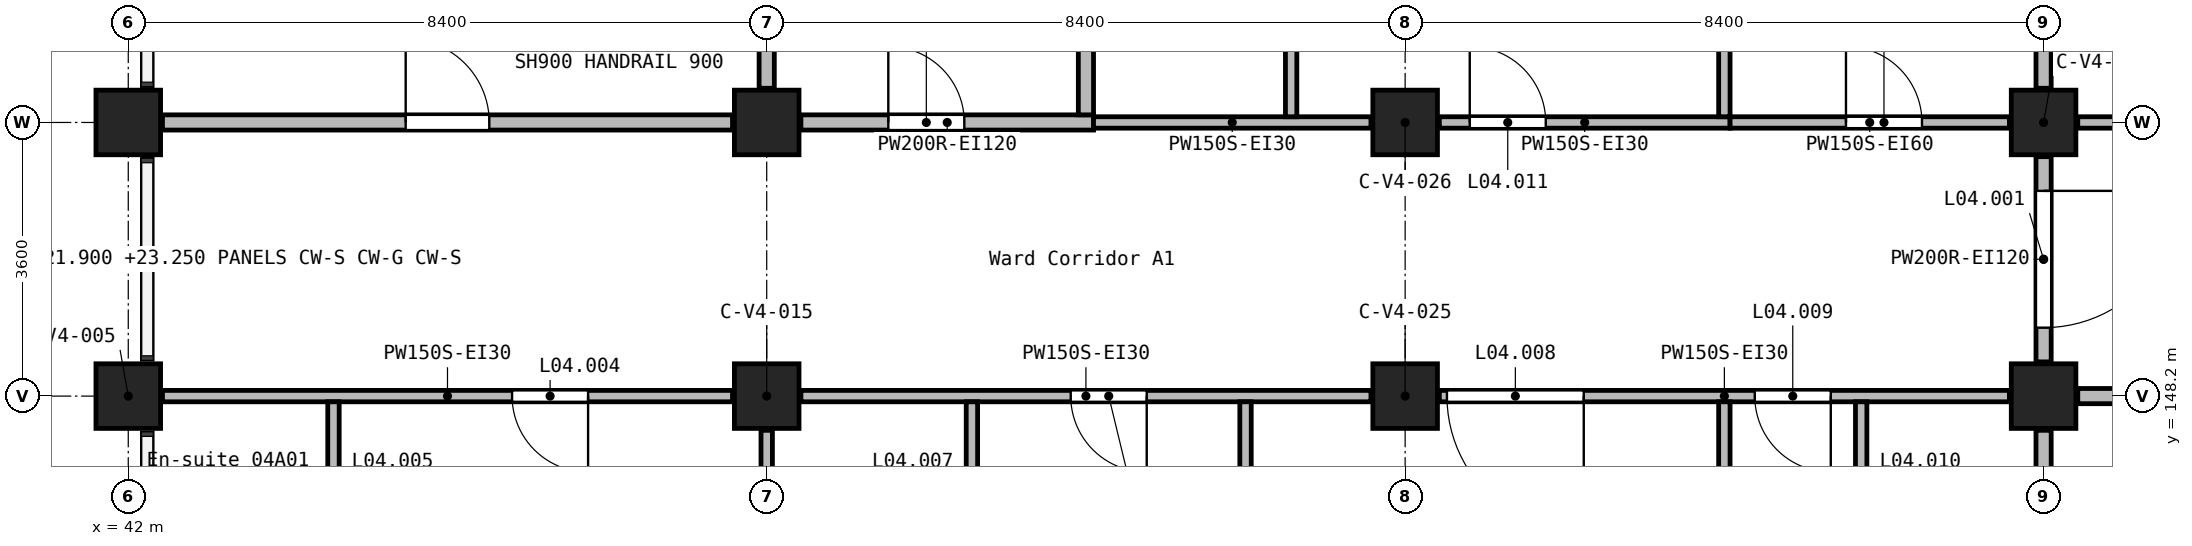
"""IFC4 building model, lengths in metres.
Left out: names, types, materials, properties, quantities, classifications, styles, units other than length and angle.
Written with IfcOpenShell. Run it as: python <this file> out.ifc"""

import sys

from ifc_helpers import new_model, si_unit, direction, frame, frame_2d, origin, origin_2d, place, context, subcontext, project, spatial, rectangle, extrude, element, fill, save


model = new_model("IFC4")
c1 = context("Model", 3, precision=1e-05, world=origin(), true_north=direction((0.0, 1.0)))
c2 = subcontext(c1, "Body", "Model", "MODEL_VIEW")
j1 = project(units=[si_unit("LENGTHUNIT", "METRE"), si_unit("PLANEANGLEUNIT", "RADIAN")], contexts=[c1])
p1 = place(None, origin())
s1 = spatial("IfcSite", under=j1, at=p1, CompositionType="ELEMENT")
p2 = place(p1, origin())
s2 = spatial("IfcBuilding", under=s1, at=p2, CompositionType="ELEMENT")
p3 = place(p2, frame((0.0, 0.0, 21.0)))
s3 = spatial("IfcBuildingStorey", under=s2, at=p3, CompositionType="ELEMENT", Elevation=21.0)
for number, where, z_axis, x_axis in (
    (1, (42.0, 148.2, 0.0), (0.0, 0.0, 1.0), (1.0, 0.0, 0.0)),
    (2, (42.0, 151.8, 0.0), (0.0, 0.0, 1.0), (1.0, 0.0, 0.0)),
    (3, (50.4, 148.2, 0.0), (0.0, 0.0, 1.0), (1.0, 0.0, 0.0)),
    (4, (50.4, 151.8, 0.0), (0.0, 0.0, 1.0), (1.0, 0.0, 0.0)),
    (5, (58.8, 148.2, 0.0), (0.0, 0.0, 1.0), (1.0, 0.0, 0.0)),
    (6, (58.8, 151.8, 0.0), (0.0, 0.0, 1.0), (1.0, 0.0, 0.0)),
    (7, (67.2, 148.2, 0.0), (0.0, 0.0, 1.0), (1.0, 0.0, 0.0)),
    (8, (67.2, 151.8, 0.0), (0.0, 0.0, 1.0), (1.0, 0.0, 0.0)),
):
    element("IfcColumn", number, at=place(p3, frame(where, z_axis=z_axis, x_axis=x_axis)), inside=s3, PredefinedType="COLUMN", context=c2, shape_type="SweptSolid", body=[
        extrude(rectangle(XDim=0.85, YDim=0.85, at=origin_2d()), origin(), (0.0, 0.0, 1.0), 3.9),
    ])
p4 = place(p3, frame((67.2, 159.15, 0.0), z_axis=(0.0, 0.0, 1.0), x_axis=(0.0, -1.0, 0.0)))
e9 = element("IfcWall", 9, at=p4, inside=s3, PredefinedType="SOLIDWALL", context=c2, shape_type="SweptSolid", body=[
    extrude(rectangle(XDim=6.9, YDim=0.2, at=frame_2d((3.45, 0.0))), origin(), (0.0, 0.0, 1.0), 3.6),
])
p5 = place(p3, frame((67.2, 151.35, 0.0), z_axis=(0.0, 0.0, 1.0), x_axis=(0.0, -1.0, 0.0)))
e10 = element("IfcWall", 10, at=p5, inside=s3, PredefinedType="SOLIDWALL", context=c2, shape_type="SweptSolid", body=[
    extrude(rectangle(XDim=2.7, YDim=0.2, at=frame_2d((1.35, 0.0))), origin(), (0.0, 0.0, 1.0), 3.6),
])
p6 = place(p5, frame((0.45, 0.0, 0.0)))
e11 = element("IfcOpeningElement", 11, at=p6, cuts=e10, PredefinedType="OPENING", context=c2, shape_type="SweptSolid", body=[
    extrude(rectangle(XDim=1.8, YDim=2.1, at=frame_2d((0.9, 1.05))), frame((0.0, 0.11, 0.0), z_axis=(0.0, -1.0, 0.0), x_axis=(1.0, 0.0, 0.0)), (0.0, 0.0, 1.0), 0.22),
])
p7 = place(p3, frame((67.2, 147.75, 0.0), z_axis=(0.0, 0.0, 1.0), x_axis=(0.0, -1.0, 0.0)))
e12 = element("IfcWall", 12, at=p7, inside=s3, PredefinedType="SOLIDWALL", context=c2, shape_type="SweptSolid", body=[
    extrude(rectangle(XDim=1.975, YDim=0.2, at=frame_2d((0.988, 0.0))), origin(), (0.0, 0.0, 1.0), 3.6),
])
p8 = place(p3, frame((42.45, 151.8, 0.0), z_axis=(0.0, 0.0, 1.0), x_axis=(1.0, 0.0, 0.0)))
e13 = element("IfcWall", 13, at=p8, inside=s3, PredefinedType="SOLIDWALL", context=c2, shape_type="SweptSolid", body=[
    extrude(rectangle(XDim=7.5, YDim=0.2, at=frame_2d((3.75, 0.0))), origin(), (0.0, 0.0, 1.0), 3.6),
])
p9 = place(p8, frame((3.2, 0.0, 0.0)))
e14 = element("IfcOpeningElement", 14, at=p9, cuts=e13, PredefinedType="OPENING", context=c2, shape_type="SweptSolid", body=[
    extrude(rectangle(XDim=1.1, YDim=2.1, at=frame_2d((0.55, 1.05))), frame((0.0, 0.11, 0.0), z_axis=(0.0, -1.0, 0.0), x_axis=(1.0, 0.0, 0.0)), (0.0, 0.0, 1.0), 0.22),
])
p10 = place(p3, frame((50.85, 151.8, 0.0), z_axis=(0.0, 0.0, 1.0), x_axis=(1.0, 0.0, 0.0)))
e15 = element("IfcWall", 15, at=p10, inside=s3, PredefinedType="SOLIDWALL", context=c2, shape_type="SweptSolid", body=[
    extrude(rectangle(XDim=3.85, YDim=0.2, at=frame_2d((1.925, 0.0))), origin(), (0.0, 0.0, 1.0), 3.6),
])
p11 = place(p10, frame((1.15, 0.0, 0.0)))
e16 = element("IfcOpeningElement", 16, at=p11, cuts=e15, PredefinedType="OPENING", context=c2, shape_type="SweptSolid", body=[
    extrude(rectangle(XDim=1.0, YDim=2.1, at=frame_2d((0.5, 1.05))), frame((0.0, 0.11, 0.0), z_axis=(0.0, -1.0, 0.0), x_axis=(1.0, 0.0, 0.0)), (0.0, 0.0, 1.0), 0.22),
])
p12 = place(p3, frame((50.4, 152.25, 0.0), z_axis=(0.0, 0.0, 1.0), x_axis=(0.0, 1.0, 0.0)))
e17 = element("IfcWall", 17, at=p12, inside=s3, PredefinedType="SOLIDWALL", context=c2, shape_type="SweptSolid", body=[
    extrude(rectangle(XDim=1.775, YDim=0.2, at=frame_2d((0.887, 0.0))), origin(), (0.0, 0.0, 1.0), 3.6),
])
p13 = place(p3, frame((67.65, 148.2, 0.0), z_axis=(0.0, 0.0, 1.0), x_axis=(1.0, 0.0, 0.0)))
e18 = element("IfcWall", 18, at=p13, inside=s3, PredefinedType="SOLIDWALL", context=c2, shape_type="SweptSolid", body=[
    extrude(rectangle(XDim=7.5, YDim=0.2, at=frame_2d((3.75, 0.0))), origin(), (0.0, 0.0, 1.0), 3.6),
])
p14 = place(p13, frame((2.85, 0.0, 0.0)))
e19 = element("IfcOpeningElement", 19, at=p14, cuts=e18, PredefinedType="OPENING", context=c2, shape_type="SweptSolid", body=[
    extrude(rectangle(XDim=1.8, YDim=2.1, at=frame_2d((0.9, 1.05))), frame((0.0, 0.11, 0.0), z_axis=(0.0, -1.0, 0.0), x_axis=(1.0, 0.0, 0.0)), (0.0, 0.0, 1.0), 0.22),
])
p15 = place(p3, frame((54.6, 151.9, 0.0), z_axis=(0.0, 0.0, 1.0), x_axis=(0.0, 1.0, 0.0)))
e20 = element("IfcWall", 20, at=p15, inside=s3, PredefinedType="SOLIDWALL", context=c2, shape_type="SweptSolid", body=[
    extrude(rectangle(XDim=7.25, YDim=0.2, at=frame_2d((3.625, 0.0))), origin(), (0.0, 0.0, 1.0), 3.6),
])
p16 = place(p3, frame((66.75, 148.2, 0.0), z_axis=(0.0, 0.0, 1.0), x_axis=(-1.0, 0.0, 0.0)))
e21 = element("IfcWall", 21, at=p16, inside=s3, PredefinedType="PARTITIONING", context=c2, shape_type="SweptSolid", body=[
    extrude(rectangle(XDim=7.5, YDim=0.15, at=frame_2d((3.75, 0.0))), origin(), (0.0, 0.0, 1.0), 3.6),
])
p17 = place(p16, frame((5.6, 0.0, 0.0)))
e22 = element("IfcOpeningElement", 22, at=p17, cuts=e21, PredefinedType="OPENING", context=c2, shape_type="SweptSolid", body=[
    extrude(rectangle(XDim=1.8, YDim=2.1, at=frame_2d((0.9, 1.05))), frame((0.0, 0.085, 0.0), z_axis=(0.0, -1.0, 0.0), x_axis=(1.0, 0.0, 0.0)), (0.0, 0.0, 1.0), 0.17),
])
p18 = place(p16, frame((2.35, 0.0, 0.0)))
e23 = element("IfcOpeningElement", 23, at=p18, cuts=e21, PredefinedType="OPENING", context=c2, shape_type="SweptSolid", body=[
    extrude(rectangle(XDim=1.0, YDim=2.1, at=frame_2d((0.5, 1.05))), frame((0.0, 0.085, 0.0), z_axis=(0.0, -1.0, 0.0), x_axis=(1.0, 0.0, 0.0)), (0.0, 0.0, 1.0), 0.17),
])
p19 = place(p3, frame((58.35, 148.2, 0.0), z_axis=(0.0, 0.0, 1.0), x_axis=(-1.0, 0.0, 0.0)))
e24 = element("IfcWall", 24, at=p19, inside=s3, PredefinedType="PARTITIONING", context=c2, shape_type="SweptSolid", body=[
    extrude(rectangle(XDim=7.5, YDim=0.15, at=frame_2d((3.75, 0.0))), origin(), (0.0, 0.0, 1.0), 3.6),
])
p20 = place(p19, frame((2.95, 0.0, 0.0)))
e25 = element("IfcOpeningElement", 25, at=p20, cuts=e24, PredefinedType="OPENING", context=c2, shape_type="SweptSolid", body=[
    extrude(rectangle(XDim=1.0, YDim=2.1, at=frame_2d((0.5, 1.05))), frame((0.0, 0.085, 0.0), z_axis=(0.0, -1.0, 0.0), x_axis=(1.0, 0.0, 0.0)), (0.0, 0.0, 1.0), 0.17),
])
p21 = place(p3, frame((49.95, 148.2, 0.0), z_axis=(0.0, 0.0, 1.0), x_axis=(-1.0, 0.0, 0.0)))
e26 = element("IfcWall", 26, at=p21, inside=s3, PredefinedType="PARTITIONING", context=c2, shape_type="SweptSolid", body=[
    extrude(rectangle(XDim=7.5, YDim=0.15, at=frame_2d((3.75, 0.0))), origin(), (0.0, 0.0, 1.0), 3.6),
])
p22 = place(p21, frame((1.9, 0.0, 0.0)))
e27 = element("IfcOpeningElement", 27, at=p22, cuts=e26, PredefinedType="OPENING", context=c2, shape_type="SweptSolid", body=[
    extrude(rectangle(XDim=1.0, YDim=2.1, at=frame_2d((0.5, 1.05))), frame((0.0, 0.085, 0.0), z_axis=(0.0, -1.0, 0.0), x_axis=(1.0, 0.0, 0.0)), (0.0, 0.0, 1.0), 0.17),
])
p23 = place(p3, frame((75.15, 151.8, 0.0), z_axis=(0.0, 0.0, 1.0), x_axis=(-1.0, 0.0, 0.0)))
e28 = element("IfcWall", 28, at=p23, inside=s3, PredefinedType="PARTITIONING", context=c2, shape_type="SweptSolid", body=[
    extrude(rectangle(XDim=7.5, YDim=0.15, at=frame_2d((3.75, 0.0))), origin(), (0.0, 0.0, 1.0), 3.6),
])
p24 = place(p23, frame((1.9, 0.0, 0.0)))
e29 = element("IfcOpeningElement", 29, at=p24, cuts=e28, PredefinedType="OPENING", context=c2, shape_type="SweptSolid", body=[
    extrude(rectangle(XDim=1.0, YDim=2.1, at=frame_2d((0.5, 1.05))), frame((0.0, 0.085, 0.0), z_axis=(0.0, -1.0, 0.0), x_axis=(1.0, 0.0, 0.0)), (0.0, 0.0, 1.0), 0.17),
])
p25 = place(p3, frame((54.7, 151.8, 0.0), z_axis=(0.0, 0.0, 1.0), x_axis=(1.0, 0.0, 0.0)))
e30 = element("IfcWall", 30, at=p25, inside=s3, PredefinedType="PARTITIONING", context=c2, shape_type="SweptSolid", body=[
    extrude(rectangle(XDim=3.65, YDim=0.15, at=frame_2d((1.825, 0.0))), origin(), (0.0, 0.0, 1.0), 3.6),
])
p26 = place(p3, frame((59.25, 151.8, 0.0), z_axis=(0.0, 0.0, 1.0), x_axis=(1.0, 0.0, 0.0)))
e31 = element("IfcWall", 31, at=p26, inside=s3, PredefinedType="PARTITIONING", context=c2, shape_type="SweptSolid", body=[
    extrude(rectangle(XDim=3.825, YDim=0.15, at=frame_2d((1.913, 0.0))), origin(), (0.0, 0.0, 1.0), 3.6),
])
p27 = place(p26, frame((0.4, 0.0, 0.0)))
e32 = element("IfcOpeningElement", 32, at=p27, cuts=e31, PredefinedType="OPENING", context=c2, shape_type="SweptSolid", body=[
    extrude(rectangle(XDim=1.0, YDim=2.1, at=frame_2d((0.5, 1.05))), frame((0.0, 0.085, 0.0), z_axis=(0.0, -1.0, 0.0), x_axis=(1.0, 0.0, 0.0)), (0.0, 0.0, 1.0), 0.17),
])
p28 = place(p3, frame((63.075, 151.8, 0.0), z_axis=(0.0, 0.0, 1.0), x_axis=(1.0, 0.0, 0.0)))
e33 = element("IfcWall", 33, at=p28, inside=s3, PredefinedType="PARTITIONING", context=c2, shape_type="SweptSolid", body=[
    extrude(rectangle(XDim=3.675, YDim=0.15, at=frame_2d((1.837, 0.0))), origin(), (0.0, 0.0, 1.0), 3.6),
])
p29 = place(p28, frame((1.525, 0.0, 0.0)))
e34 = element("IfcOpeningElement", 34, at=p29, cuts=e33, PredefinedType="OPENING", context=c2, shape_type="SweptSolid", body=[
    extrude(rectangle(XDim=1.0, YDim=2.1, at=frame_2d((0.5, 1.05))), frame((0.0, 0.085, 0.0), z_axis=(0.0, -1.0, 0.0), x_axis=(1.0, 0.0, 0.0)), (0.0, 0.0, 1.0), 0.17),
])
p30 = place(p3, frame((50.4, 140.85, 0.0), z_axis=(0.0, 0.0, 1.0), x_axis=(0.0, 1.0, 0.0)))
e35 = element("IfcWall", 35, at=p30, inside=s3, PredefinedType="PARTITIONING", context=c2, shape_type="SweptSolid", body=[
    extrude(rectangle(XDim=6.9, YDim=0.15, at=frame_2d((3.45, 0.0))), origin(), (0.0, 0.0, 1.0), 3.6),
])
for number, where, z_axis, x_axis in (
    (36, (56.7, 140.85, 0.0), (0.0, 0.0, 1.0), (0.0, 1.0, 0.0)),
    (37, (63.0, 140.85, 0.0), (0.0, 0.0, 1.0), (0.0, 1.0, 0.0)),
    (38, (63.0, 151.875, 0.0), (0.0, 0.0, 1.0), (0.0, 1.0, 0.0)),
):
    element("IfcWall", number, at=place(p3, frame(where, z_axis=z_axis, x_axis=x_axis)), inside=s3, PredefinedType="PARTITIONING", context=c2, shape_type="SweptSolid", body=[
        extrude(rectangle(XDim=7.275, YDim=0.15, at=frame_2d((3.637, 0.0))), origin(), (0.0, 0.0, 1.0), 3.6),
    ])
p31 = place(p3, frame((44.7, 144.825, 0.0), z_axis=(0.0, 0.0, 1.0), x_axis=(0.0, 1.0, 0.0)))
e39 = element("IfcWall", 39, at=p31, inside=s3, PredefinedType="PARTITIONING", context=c2, shape_type="SweptSolid", body=[
    extrude(rectangle(XDim=3.3, YDim=0.15, at=frame_2d((1.65, 0.0))), origin(), (0.0, 0.0, 1.0), 3.6),
])
p32 = place(p31, frame((1.275, 0.0, 0.0)))
e40 = element("IfcOpeningElement", 40, at=p32, cuts=e39, PredefinedType="OPENING", context=c2, shape_type="SweptSolid", body=[
    extrude(rectangle(XDim=0.9, YDim=2.1, at=frame_2d((0.45, 1.05))), frame((0.0, 0.085, 0.0), z_axis=(0.0, -1.0, 0.0), x_axis=(1.0, 0.0, 0.0)), (0.0, 0.0, 1.0), 0.17),
])
p33 = place(p3, frame((53.1, 144.825, 0.0), z_axis=(0.0, 0.0, 1.0), x_axis=(0.0, 1.0, 0.0)))
e41 = element("IfcWall", 41, at=p33, inside=s3, PredefinedType="PARTITIONING", context=c2, shape_type="SweptSolid", body=[
    extrude(rectangle(XDim=3.3, YDim=0.15, at=frame_2d((1.65, 0.0))), origin(), (0.0, 0.0, 1.0), 3.6),
])
p34 = place(p33, frame((1.275, 0.0, 0.0)))
e42 = element("IfcOpeningElement", 42, at=p34, cuts=e41, PredefinedType="OPENING", context=c2, shape_type="SweptSolid", body=[
    extrude(rectangle(XDim=0.9, YDim=2.1, at=frame_2d((0.45, 1.05))), frame((0.0, 0.085, 0.0), z_axis=(0.0, -1.0, 0.0), x_axis=(1.0, 0.0, 0.0)), (0.0, 0.0, 1.0), 0.17),
])
p35 = place(p3, frame((57.3, 151.875, 0.0), z_axis=(0.0, 0.0, 1.0), x_axis=(0.0, 1.0, 0.0)))
e43 = element("IfcWall", 43, at=p35, inside=s3, PredefinedType="PARTITIONING", context=c2, shape_type="SweptSolid", body=[
    extrude(rectangle(XDim=3.3, YDim=0.15, at=frame_2d((1.65, 0.0))), origin(), (0.0, 0.0, 1.0), 3.6),
])
p36 = place(p35, frame((1.125, 0.0, 0.0)))
e44 = element("IfcOpeningElement", 44, at=p36, cuts=e43, PredefinedType="OPENING", context=c2, shape_type="SweptSolid", body=[
    extrude(rectangle(XDim=0.9, YDim=2.1, at=frame_2d((0.45, 1.05))), frame((0.0, 0.085, 0.0), z_axis=(0.0, -1.0, 0.0), x_axis=(1.0, 0.0, 0.0)), (0.0, 0.0, 1.0), 0.17),
])
p37 = place(p3, frame((64.8, 144.825, 0.0), z_axis=(0.0, 0.0, 1.0), x_axis=(0.0, 1.0, 0.0)))
e45 = element("IfcWall", 45, at=p37, inside=s3, PredefinedType="PARTITIONING", context=c2, shape_type="SweptSolid", body=[
    extrude(rectangle(XDim=3.3, YDim=0.15, at=frame_2d((1.65, 0.0))), origin(), (0.0, 0.0, 1.0), 3.6),
])
p38 = place(p37, frame((1.275, 0.0, 0.0)))
e46 = element("IfcOpeningElement", 46, at=p38, cuts=e45, PredefinedType="OPENING", context=c2, shape_type="SweptSolid", body=[
    extrude(rectangle(XDim=0.9, YDim=2.1, at=frame_2d((0.45, 1.05))), frame((0.0, 0.085, 0.0), z_axis=(0.0, -1.0, 0.0), x_axis=(1.0, 0.0, 0.0)), (0.0, 0.0, 1.0), 0.17),
])
p39 = place(p6, origin())
e47 = element("IfcDoor", 47, at=p39, inside=s3, OperationType="DOUBLE_DOOR_SINGLE_SWING", PredefinedType="DOOR", context=c2, shape_type="SweptSolid", body=[
    extrude(rectangle(XDim=1.8, YDim=2.1, at=frame_2d((0.9, 1.05))), frame((0.0, 0.025, 0.0), z_axis=(0.0, -1.0, 0.0), x_axis=(1.0, 0.0, 0.0)), (0.0, 0.0, 1.0), 0.05),
])
fill(e11, e47)
p40 = place(p22, origin())
e48 = element("IfcDoor", 48, at=p40, inside=s3, OperationType="SINGLE_SWING_LEFT", PredefinedType="DOOR", context=c2, shape_type="SweptSolid", body=[
    extrude(rectangle(XDim=1.0, YDim=2.1, at=frame_2d((0.5, 1.05))), frame((0.0, 0.025, 0.0), z_axis=(0.0, -1.0, 0.0), x_axis=(1.0, 0.0, 0.0)), (0.0, 0.0, 1.0), 0.05),
])
fill(e27, e48)
p41 = place(p20, origin())
e49 = element("IfcDoor", 49, at=p41, inside=s3, OperationType="SINGLE_SWING_LEFT", PredefinedType="DOOR", context=c2, shape_type="SweptSolid", body=[
    extrude(rectangle(XDim=1.0, YDim=2.1, at=frame_2d((0.5, 1.05))), frame((0.0, 0.025, 0.0), z_axis=(0.0, -1.0, 0.0), x_axis=(1.0, 0.0, 0.0)), (0.0, 0.0, 1.0), 0.05),
])
fill(e25, e49)
p42 = place(p17, origin())
e50 = element("IfcDoor", 50, at=p42, inside=s3, OperationType="DOUBLE_DOOR_SINGLE_SWING", PredefinedType="DOOR", context=c2, shape_type="SweptSolid", body=[
    extrude(rectangle(XDim=1.8, YDim=2.1, at=frame_2d((0.9, 1.05))), frame((0.0, 0.025, 0.0), z_axis=(0.0, -1.0, 0.0), x_axis=(1.0, 0.0, 0.0)), (0.0, 0.0, 1.0), 0.05),
])
fill(e22, e50)
p43 = place(p18, origin())
e51 = element("IfcDoor", 51, at=p43, inside=s3, OperationType="SINGLE_SWING_LEFT", PredefinedType="DOOR", context=c2, shape_type="SweptSolid", body=[
    extrude(rectangle(XDim=1.0, YDim=2.1, at=frame_2d((0.5, 1.05))), frame((0.0, 0.025, 0.0), z_axis=(0.0, -1.0, 0.0), x_axis=(1.0, 0.0, 0.0)), (0.0, 0.0, 1.0), 0.05),
])
fill(e23, e51)
p44 = place(p27, origin())
e52 = element("IfcDoor", 52, at=p44, inside=s3, OperationType="SINGLE_SWING_LEFT", PredefinedType="DOOR", context=c2, shape_type="SweptSolid", body=[
    extrude(rectangle(XDim=1.0, YDim=2.1, at=frame_2d((0.5, 1.05))), frame((0.0, 0.025, 0.0), z_axis=(0.0, -1.0, 0.0), x_axis=(1.0, 0.0, 0.0)), (0.0, 0.0, 1.0), 0.05),
])
fill(e32, e52)
p45 = place(p29, origin())
e53 = element("IfcDoor", 53, at=p45, inside=s3, OperationType="SINGLE_SWING_RIGHT", PredefinedType="DOOR", context=c2, shape_type="SweptSolid", body=[
    extrude(rectangle(XDim=1.0, YDim=2.1, at=frame_2d((0.5, 1.05))), frame((0.0, 0.025, 0.0), z_axis=(0.0, -1.0, 0.0), x_axis=(1.0, 0.0, 0.0)), (0.0, 0.0, 1.0), 0.05),
])
fill(e34, e53)
p46 = place(p11, origin())
e54 = element("IfcDoor", 54, at=p46, inside=s3, OperationType="SINGLE_SWING_LEFT", PredefinedType="DOOR", context=c2, shape_type="SweptSolid", body=[
    extrude(rectangle(XDim=1.0, YDim=2.1, at=frame_2d((0.5, 1.05))), frame((0.0, 0.025, 0.0), z_axis=(0.0, -1.0, 0.0), x_axis=(1.0, 0.0, 0.0)), (0.0, 0.0, 1.0), 0.05),
])
fill(e16, e54)
p47 = place(p9, origin())
e55 = element("IfcDoor", 55, at=p47, inside=s3, OperationType="SINGLE_SWING_RIGHT", PredefinedType="DOOR", context=c2, shape_type="SweptSolid", body=[
    extrude(rectangle(XDim=1.1, YDim=2.1, at=frame_2d((0.55, 1.05))), frame((0.0, 0.025, 0.0), z_axis=(0.0, -1.0, 0.0), x_axis=(1.0, 0.0, 0.0)), (0.0, 0.0, 1.0), 0.05),
])
fill(e14, e55)
save(model, sys.argv[1])
